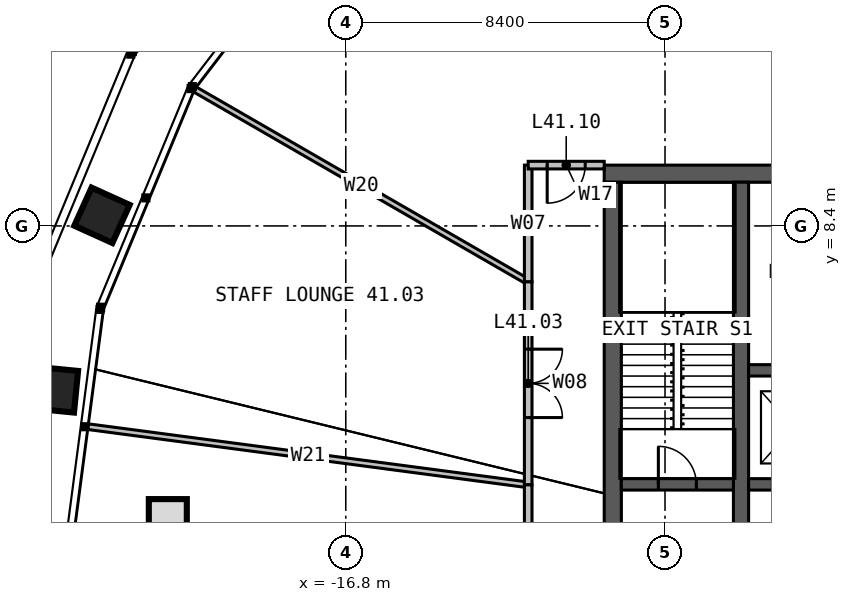
"""IFC4 building model, lengths in metres.
Left out: names, types, materials, properties, quantities, classifications, styles, units other than length and angle.
Written with IfcOpenShell. Run it as: python <this file> out.ifc"""

import sys

from ifc_helpers import new_model, si_unit, direction, frame, frame_2d, origin, place, context, subcontext, project, spatial, rectangle, extrude, element, fill, save


model = new_model("IFC4")
c1 = context("Model", 3, precision=1e-05, world=origin(), true_north=direction((0.0, 1.0)))
c2 = subcontext(c1, "Body", "Model", "MODEL_VIEW")
j1 = project(units=[si_unit("LENGTHUNIT", "METRE"), si_unit("PLANEANGLEUNIT", "RADIAN")], contexts=[c1])
p1 = place(None, origin())
s1 = spatial("IfcSite", under=j1, at=p1, CompositionType="ELEMENT")
p2 = place(p1, origin())
s2 = spatial("IfcBuilding", under=s1, at=p2, CompositionType="ELEMENT")
p3 = place(p2, frame((0.0, 0.0, 171.0)))
s3 = spatial("IfcBuildingStorey", under=s2, at=p3, CompositionType="ELEMENT", Elevation=171.0)
p4 = place(p3, frame((-10.0, 9.775, 0.0), z_axis=(0.0, 0.0, 1.0), x_axis=(1.0, 0.0, 0.0)))
e1 = element("IfcWall", 1, at=p4, inside=s3, PredefinedType="SOLIDWALL", context=c2, shape_type="SweptSolid", body=[
    extrude(rectangle(XDim=20.0, YDim=0.45, at=frame_2d((10.0, 0.0))), origin(), (0.0, 0.0, 1.0), 4.0),
])
p5 = place(p4, frame((9.4, 0.0, 0.0)))
e2 = element("IfcOpeningElement", 2, at=p5, cuts=e1, PredefinedType="OPENING", context=c2, shape_type="SweptSolid", body=[
    extrude(rectangle(XDim=1.2, YDim=2.2, at=frame_2d((0.6, 1.1))), frame((0.0, 0.235, 0.0), z_axis=(0.0, -1.0, 0.0), x_axis=(1.0, 0.0, 0.0)), (0.0, 0.0, 1.0), 0.47),
])
p6 = place(p3, frame((-9.775, 9.55, 0.0), z_axis=(0.0, 0.0, 1.0), x_axis=(0.0, -1.0, 0.0)))
e3 = element("IfcWall", 3, at=p6, inside=s3, PredefinedType="SOLIDWALL", context=c2, shape_type="SweptSolid", body=[
    extrude(rectangle(XDim=19.1, YDim=0.45, at=frame_2d((9.55, 0.0))), origin(), (0.0, 0.0, 1.0), 4.0),
])
p7 = place(p3, frame((-6.4, -9.55, 0.0), z_axis=(0.0, 0.0, 1.0), x_axis=(0.0, 1.0, 0.0)))
e4 = element("IfcWall", 4, at=p7, inside=s3, PredefinedType="SOLIDWALL", context=c2, shape_type="SweptSolid", body=[
    extrude(rectangle(XDim=19.1, YDim=0.4, at=frame_2d((9.55, 0.0))), origin(), (0.0, 0.0, 1.0), 4.0),
])
p8 = place(p7, frame((9.05, 0.0, 0.0)))
e5 = element("IfcOpeningElement", 5, at=p8, cuts=e4, PredefinedType="OPENING", context=c2, shape_type="SweptSolid", body=[
    extrude(rectangle(XDim=1.0, YDim=2.2, at=frame_2d((0.5, 1.1))), frame((0.0, 0.21, 0.0), z_axis=(0.0, -1.0, 0.0), x_axis=(1.0, 0.0, 0.0)), (0.0, 0.0, 1.0), 0.42),
])
p9 = place(p3, frame((-6.2, 1.6, 0.0), z_axis=(0.0, 0.0, 1.0), x_axis=(1.0, 0.0, 0.0)))
e6 = element("IfcWall", 6, at=p9, inside=s3, PredefinedType="SOLIDWALL", context=c2, shape_type="SweptSolid", body=[
    extrude(rectangle(XDim=4.85, YDim=0.3, at=frame_2d((2.425, 0.0))), origin(), (0.0, 0.0, 1.0), 4.0),
])
p10 = place(p9, frame((0.625, 0.0, 0.0)))
e7 = element("IfcOpeningElement", 7, at=p10, cuts=e6, PredefinedType="OPENING", context=c2, shape_type="SweptSolid", body=[
    extrude(rectangle(XDim=1.1, YDim=2.2, at=frame_2d((0.55, 1.1))), frame((0.0, 0.16, 0.0), z_axis=(0.0, -1.0, 0.0), x_axis=(1.0, 0.0, 0.0)), (0.0, 0.0, 1.0), 0.32),
])
p11 = place(p9, frame((3.15, 0.0, 0.0)))
e8 = element("IfcOpeningElement", 8, at=p11, cuts=e6, PredefinedType="OPENING", context=c2, shape_type="SweptSolid", body=[
    extrude(rectangle(XDim=1.1, YDim=2.2, at=frame_2d((0.55, 1.1))), frame((0.0, 0.16, 0.0), z_axis=(0.0, -1.0, 0.0), x_axis=(1.0, 0.0, 0.0)), (0.0, 0.0, 1.0), 0.32),
])
p12 = place(p3, frame((-6.2, 4.6, 0.0), z_axis=(0.0, 0.0, 1.0), x_axis=(1.0, 0.0, 0.0)))
e9 = element("IfcWall", 9, at=p12, inside=s3, PredefinedType="SOLIDWALL", context=c2, shape_type="SweptSolid", body=[
    extrude(rectangle(XDim=4.85, YDim=0.3, at=frame_2d((2.425, 0.0))), origin(), (0.0, 0.0, 1.0), 4.0),
])
p13 = place(p3, frame((-9.55, 1.6, 0.0), z_axis=(0.0, 0.0, 1.0), x_axis=(1.0, 0.0, 0.0)))
e10 = element("IfcWall", 10, at=p13, inside=s3, PredefinedType="SOLIDWALL", context=c2, shape_type="SweptSolid", body=[
    extrude(rectangle(XDim=2.95, YDim=0.3, at=frame_2d((1.475, 0.0))), origin(), (0.0, 0.0, 1.0), 4.0),
])
p14 = place(p13, frame((0.975, 0.0, 0.0)))
e11 = element("IfcOpeningElement", 11, at=p14, cuts=e10, PredefinedType="OPENING", context=c2, shape_type="SweptSolid", body=[
    extrude(rectangle(XDim=1.0, YDim=2.2, at=frame_2d((0.5, 1.1))), frame((0.0, 0.16, 0.0), z_axis=(0.0, -1.0, 0.0), x_axis=(1.0, 0.0, 0.0)), (0.0, 0.0, 1.0), 0.32),
])
p15 = place(p3, frame((-12.0, 6.928, 0.0), z_axis=(0.0, 0.0, 1.0), x_axis=(-0.866025941747, 0.49999906822, 0.0)))
e12 = element("IfcWall", 12, at=p15, inside=s3, PredefinedType="PARTITIONING", context=c2, shape_type="SweptSolid", body=[
    extrude(rectangle(XDim=10.136, YDim=0.15, at=frame_2d((5.068, 0.0))), origin(), (0.0, 0.0, 1.0), 2.79),
])
p16 = place(p3, frame((-12.0, 1.587, 0.0), z_axis=(0.0, 0.0, 1.0), x_axis=(-0.991370229238, 0.131091832627, 0.0)))
e13 = element("IfcWall", 13, at=p16, inside=s3, PredefinedType="PARTITIONING", context=c2, shape_type="SweptSolid", body=[
    extrude(rectangle(XDim=11.683, YDim=0.15, at=frame_2d((5.841, 0.0))), origin(), (0.0, 0.0, 1.0), 2.79),
])
p17 = place(p3, frame((-12.0, 10.0, 0.0), z_axis=(0.0, 0.0, 1.0), x_axis=(0.0, -1.0, 0.0)))
e14 = element("IfcWall", 14, at=p17, inside=s3, PredefinedType="PARTITIONING", context=c2, shape_type="SweptSolid", body=[
    extrude(rectangle(XDim=3.072, YDim=0.2, at=frame_2d((1.536, 0.0))), origin(), (0.0, 0.0, 1.0), 3.8),
])
p18 = place(p3, frame((-12.0, 6.928, 0.0), z_axis=(0.0, 0.0, 1.0), x_axis=(0.0, -1.0, 0.0)))
e15 = element("IfcWall", 15, at=p18, inside=s3, PredefinedType="PARTITIONING", context=c2, shape_type="SweptSolid", body=[
    extrude(rectangle(XDim=5.342, YDim=0.2, at=frame_2d((2.671, 0.0))), origin(), (0.0, 0.0, 1.0), 3.8),
])
p19 = place(p18, frame((1.771, 0.0, 0.0)))
e16 = element("IfcOpeningElement", 16, at=p19, cuts=e15, PredefinedType="OPENING", context=c2, shape_type="SweptSolid", body=[
    extrude(rectangle(XDim=1.8, YDim=2.2, at=frame_2d((0.9, 1.1))), frame((0.0, 0.11, 0.0), z_axis=(0.0, -1.0, 0.0), x_axis=(1.0, 0.0, 0.0)), (0.0, 0.0, 1.0), 0.22),
])
p20 = place(p3, frame((-12.0, 1.587, 0.0), z_axis=(0.0, 0.0, 1.0), x_axis=(0.0, -1.0, 0.0)))
e17 = element("IfcWall", 17, at=p20, inside=s3, PredefinedType="PARTITIONING", context=c2, shape_type="SweptSolid", body=[
    extrude(rectangle(XDim=10.124, YDim=0.2, at=frame_2d((5.062, 0.0))), origin(), (0.0, 0.0, 1.0), 3.2),
])
p21 = place(p20, frame((4.503, 0.0, 0.0)))
e18 = element("IfcOpeningElement", 18, at=p21, cuts=e17, PredefinedType="OPENING", context=c2, shape_type="SweptSolid", body=[
    extrude(rectangle(XDim=1.8, YDim=2.2, at=frame_2d((0.9, 1.1))), frame((0.0, 0.11, 0.0), z_axis=(0.0, -1.0, 0.0), x_axis=(1.0, 0.0, 0.0)), (0.0, 0.0, 1.0), 0.22),
])
p22 = place(p3, frame((-10.0, 10.0, 0.0), z_axis=(0.0, 0.0, 1.0), x_axis=(-1.0, 0.0, 0.0)))
e19 = element("IfcWall", 19, at=p22, inside=s3, PredefinedType="PARTITIONING", context=c2, shape_type="SweptSolid", body=[
    extrude(rectangle(XDim=2.0, YDim=0.2, at=frame_2d((1.0, 0.0))), origin(), (0.0, 0.0, 1.0), 3.8),
])
p23 = place(p22, frame((0.5, 0.0, 0.0)))
e20 = element("IfcOpeningElement", 20, at=p23, cuts=e19, PredefinedType="OPENING", context=c2, shape_type="SweptSolid", body=[
    extrude(rectangle(XDim=1.0, YDim=2.2, at=frame_2d((0.5, 1.1))), frame((0.0, 0.11, 0.0), z_axis=(0.0, -1.0, 0.0), x_axis=(1.0, 0.0, 0.0)), (0.0, 0.0, 1.0), 0.22),
])
p24 = place(p14, origin())
e21 = element("IfcDoor", 21, at=p24, inside=s3, OperationType="SINGLE_SWING_LEFT", PredefinedType="DOOR", context=c2, shape_type="SweptSolid", body=[
    extrude(rectangle(XDim=1.0, YDim=2.2, at=frame_2d((0.5, 1.1))), frame((0.0, 0.025, 0.0), z_axis=(0.0, -1.0, 0.0), x_axis=(1.0, 0.0, 0.0)), (0.0, 0.0, 1.0), 0.05),
])
fill(e11, e21)
p25 = place(p19, origin())
e22 = element("IfcDoor", 22, at=p25, inside=s3, OperationType="DOUBLE_DOOR_SINGLE_SWING", PredefinedType="DOOR", context=c2, shape_type="SweptSolid", body=[
    extrude(rectangle(XDim=1.8, YDim=2.2, at=frame_2d((0.9, 1.1))), frame((0.0, 0.025, 0.0), z_axis=(0.0, -1.0, 0.0), x_axis=(1.0, 0.0, 0.0)), (0.0, 0.0, 1.0), 0.05),
])
fill(e16, e22)
p26 = place(p23, origin())
e23 = element("IfcDoor", 23, at=p26, inside=s3, OperationType="SINGLE_SWING_RIGHT", PredefinedType="DOOR", context=c2, shape_type="SweptSolid", body=[
    extrude(rectangle(XDim=1.0, YDim=2.2, at=frame_2d((0.5, 1.1))), frame((0.0, 0.025, 0.0), z_axis=(0.0, -1.0, 0.0), x_axis=(1.0, 0.0, 0.0)), (0.0, 0.0, 1.0), 0.05),
])
fill(e20, e23)
save(model, sys.argv[1])
